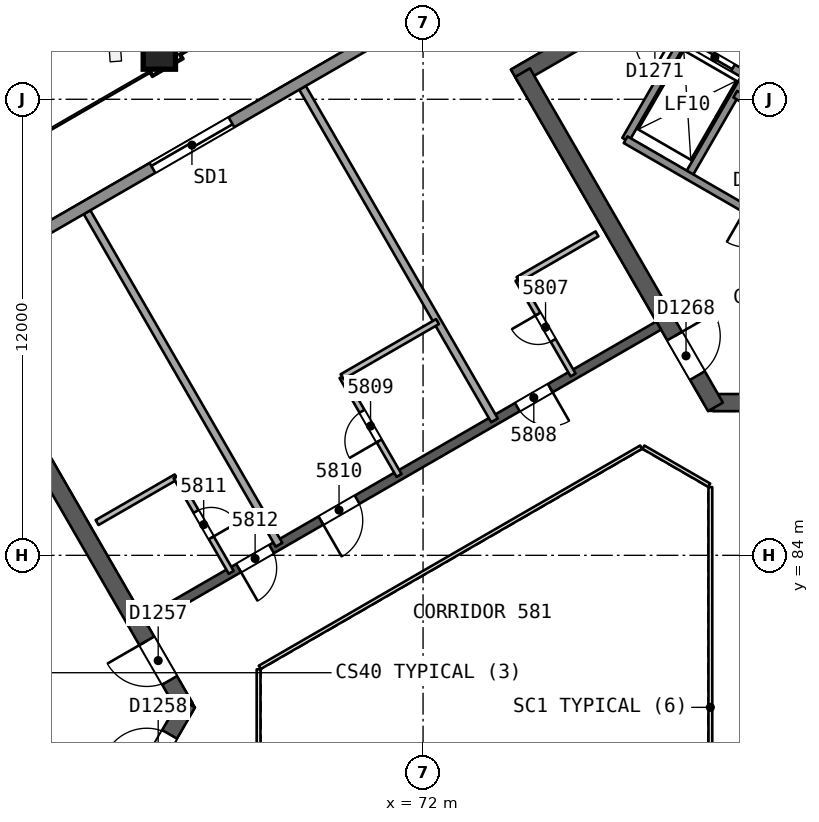
"""IFC4 building model, lengths in metres.
Left out: names, types, materials, properties, quantities, classifications, styles, units other than length and angle.
Written with IfcOpenShell. Run it as: python <this file> out.ifc"""

import sys

from ifc_helpers import new_model, si_unit, direction, frame, frame_2d, origin, origin_2d, place, context, subcontext, project, spatial, rectangle, extrude, element, fill, save


model = new_model("IFC4")
c1 = context("Model", 3, precision=1e-05, world=origin(), true_north=direction((0.0, 1.0)))
c2 = subcontext(c1, "Body", "Model", "MODEL_VIEW")
j1 = project(units=[si_unit("LENGTHUNIT", "METRE"), si_unit("PLANEANGLEUNIT", "RADIAN")], contexts=[c1])
p1 = place(None, origin())
s1 = spatial("IfcSite", under=j1, at=p1, CompositionType="ELEMENT")
p2 = place(p1, origin())
s2 = spatial("IfcBuilding", under=s1, at=p2, CompositionType="ELEMENT")
p3 = place(p2, frame((0.0, 0.0, 235.4)))
s3 = spatial("IfcBuildingStorey", under=s2, at=p3, CompositionType="ELEMENT", Elevation=235.4)
p4 = place(p3, frame((65.74, 80.0, 0.0), z_axis=(0.0, 0.0, 1.0), x_axis=(-0.499991857942, 0.866030104553, 0.0)))
e1 = element("IfcWall", 1, at=p4, inside=s3, PredefinedType="SHEAR", context=c2, shape_type="SweptSolid", body=[
    extrude(rectangle(XDim=10.25, YDim=0.45, at=frame_2d((5.125, 0.0))), origin(), (0.0, 0.0, 1.0), 3.7),
])
p5 = place(p4, frame((0.82, 0.0, 0.0)))
e2 = element("IfcOpeningElement", 2, at=p5, cuts=e1, PredefinedType="OPENING", context=c2, shape_type="SweptSolid", body=[
    extrude(rectangle(XDim=1.2, YDim=2.1, at=frame_2d((0.6, 1.05))), frame((0.0, 0.235, 0.0), z_axis=(0.0, -1.0, 0.0), x_axis=(1.0, 0.0, 0.0)), (0.0, 0.0, 1.0), 0.471),
])
p6 = place(p3, frame((60.728, 71.318, 0.0), z_axis=(0.0, 0.0, 1.0), x_axis=(0.500012416173, 0.866018235185, 0.0)))
e3 = element("IfcWall", 3, at=p6, inside=s3, PredefinedType="SHEAR", context=c2, shape_type="SweptSolid", body=[
    extrude(rectangle(XDim=10.155, YDim=0.45, at=frame_2d((5.078, 0.0))), origin(), (0.0, 0.0, 1.0), 3.7),
])
p7 = place(p6, frame((8.005, 0.0, 0.0)))
e4 = element("IfcOpeningElement", 4, at=p7, cuts=e3, PredefinedType="OPENING", context=c2, shape_type="SweptSolid", body=[
    extrude(rectangle(XDim=1.2, YDim=2.1, at=frame_2d((0.6, 1.05))), frame((0.0, 0.235, 0.0), z_axis=(0.0, -1.0, 0.0), x_axis=(1.0, 0.0, 0.0)), (0.0, 0.0, 1.0), 0.471),
])
p8 = place(p3, frame((79.63, 88.019, 0.0), z_axis=(0.0, 0.0, 1.0), x_axis=(1.0, 0.0, 0.0)))
e5 = element("IfcWall", 5, at=p8, inside=s3, PredefinedType="SHEAR", context=c2, shape_type="SweptSolid", body=[
    extrude(rectangle(XDim=10.25, YDim=0.45, at=frame_2d((5.125, 0.0))), origin(), (0.0, 0.0, 1.0), 3.7),
])
p9 = place(p8, frame((0.82, 0.0, 0.0)))
e6 = element("IfcOpeningElement", 6, at=p9, cuts=e5, PredefinedType="OPENING", context=c2, shape_type="SweptSolid", body=[
    extrude(rectangle(XDim=1.2, YDim=2.1, at=frame_2d((0.6, 1.05))), frame((0.0, 0.235, 0.0), z_axis=(0.0, -1.0, 0.0), x_axis=(1.0, 0.0, 0.0)), (0.0, 0.0, 1.0), 0.471),
])
p10 = place(p3, frame((86.723, 103.69, 0.0), z_axis=(0.0, 0.0, 1.0), x_axis=(-0.866022713978, -0.500004658852, 0.0)))
e7 = element("IfcWall", 7, at=p10, inside=s3, PredefinedType="SHEAR", context=c2, shape_type="SweptSolid", body=[
    extrude(rectangle(XDim=14.203, YDim=0.45, at=frame_2d((7.102, 0.0))), origin(), (0.0, 0.0, 1.0), 3.7),
])
p11 = place(p3, frame((74.617, 96.701, 0.0), z_axis=(0.0, 0.0, 1.0), x_axis=(0.499994385119, -0.866028645513, 0.0)))
e8 = element("IfcWall", 8, at=p11, inside=s3, PredefinedType="SHEAR", context=c2, shape_type="SweptSolid", body=[
    extrude(rectangle(XDim=10.155, YDim=0.45, at=frame_2d((5.077, 0.0))), origin(), (0.0, 0.0, 1.0), 3.7),
])
p12 = place(p11, frame((8.005, 0.0, 0.0)))
e9 = element("IfcOpeningElement", 9, at=p12, cuts=e8, PredefinedType="OPENING", context=c2, shape_type="SweptSolid", body=[
    extrude(rectangle(XDim=1.2, YDim=2.1, at=frame_2d((0.6, 1.05))), frame((0.0, 0.235, 0.0), z_axis=(0.0, -1.0, 0.0), x_axis=(1.0, 0.0, 0.0)), (0.0, 0.0, 1.0), 0.471),
])
p13 = place(p3, frame((78.2, 90.046, 0.0), z_axis=(0.0, 0.0, 1.0), x_axis=(-0.866026492143, -0.499998114903, 0.0)))
e10 = element("IfcWall", 10, at=p13, inside=s3, PredefinedType="SHEAR", context=c2, shape_type="SweptSolid", body=[
    extrude(rectangle(XDim=15.588, YDim=0.25, at=frame_2d((7.794, 0.0))), origin(), (0.0, 0.0, 1.0), 3.3),
])
p14 = place(p13, frame((3.294, 0.0, 0.0)))
e11 = element("IfcOpeningElement", 11, at=p14, cuts=e10, PredefinedType="OPENING", context=c2, shape_type="SweptSolid", body=[
    extrude(rectangle(XDim=1.0, YDim=2.1, at=frame_2d((0.5, 1.05))), frame((0.0, 0.135, 0.0), z_axis=(0.0, -1.0, 0.0), x_axis=(1.0, 0.0, 0.0)), (0.0, 0.0, 1.0), 0.271),
])
p15 = place(p13, frame((9.162, 0.0, 0.0)))
e12 = element("IfcOpeningElement", 12, at=p15, cuts=e10, PredefinedType="OPENING", context=c2, shape_type="SweptSolid", body=[
    extrude(rectangle(XDim=1.1, YDim=2.1, at=frame_2d((0.55, 1.05))), frame((0.0, 0.135, 0.0), z_axis=(0.0, -1.0, 0.0), x_axis=(1.0, 0.0, 0.0)), (0.0, 0.0, 1.0), 0.271),
])
p16 = place(p13, frame((11.762, 0.0, 0.0)))
e13 = element("IfcOpeningElement", 13, at=p16, cuts=e10, PredefinedType="OPENING", context=c2, shape_type="SweptSolid", body=[
    extrude(rectangle(XDim=1.0, YDim=2.1, at=frame_2d((0.5, 1.05))), frame((0.0, 0.135, 0.0), z_axis=(0.0, -1.0, 0.0), x_axis=(1.0, 0.0, 0.0)), (0.0, 0.0, 1.0), 0.271),
])
p17 = place(p3, frame((65.048, 97.237, 0.0), z_axis=(0.010092954999, -0.017481261926, 0.999796248113), x_axis=(-0.499897099477, 0.865849541015, 0.020185694417)))
e14 = element("IfcColumn", 14, at=p17, inside=s3, PredefinedType="COLUMN", context=c2, shape_type="SweptSolid", body=[
    extrude(rectangle(XDim=0.85, YDim=0.85, at=origin_2d()), origin(), (0.0, 0.0, 1.0), 3.701),
])
p18 = place(p3, frame((75.948, 88.746, 0.0), z_axis=(0.0, 0.0, 1.0), x_axis=(-0.499987231761, 0.866032775405, 0.0)))
e15 = element("IfcWall", 15, at=p18, inside=s3, PredefinedType="PARTITIONING", context=c2, shape_type="SweptSolid", body=[
    extrude(rectangle(XDim=2.9, YDim=0.15, at=frame_2d((1.45, 0.0))), origin(), (0.0, 0.0, 1.0), 3.3),
])
p19 = place(p18, frame((1.05, 0.0, 0.0)))
e16 = element("IfcOpeningElement", 16, at=p19, cuts=e15, PredefinedType="OPENING", context=c2, shape_type="SweptSolid", body=[
    extrude(rectangle(XDim=0.8, YDim=2.1, at=frame_2d((0.4, 1.05))), frame((0.0, 0.085, 0.0), z_axis=(0.0, -1.0, 0.0), x_axis=(1.0, 0.0, 0.0)), (0.0, 0.0, 1.0), 0.171),
])
p20 = place(p3, frame((74.498, 91.257, 0.0), z_axis=(0.0, 0.0, 1.0), x_axis=(0.866038271014, 0.499977712642, 0.0)))
e17 = element("IfcWall", 17, at=p20, inside=s3, PredefinedType="PARTITIONING", context=c2, shape_type="SweptSolid", body=[
    extrude(rectangle(XDim=2.401, YDim=0.15, at=frame_2d((1.2, 0.0))), origin(), (0.0, 0.0, 1.0), 3.3),
])
p21 = place(p3, frame((68.828, 96.302, 0.0), z_axis=(0.0, 0.0, 1.0), x_axis=(0.499992962407, -0.866029466902, 0.0)))
e18 = element("IfcWall", 18, at=p21, inside=s3, PredefinedType="PARTITIONING", context=c2, shape_type="SweptSolid", body=[
    extrude(rectangle(XDim=10.104, YDim=0.2, at=frame_2d((5.052, 0.0))), origin(), (0.0, 0.0, 1.0), 3.3),
])
p22 = place(p3, frame((71.368, 86.102, 0.0), z_axis=(0.0, 0.0, 1.0), x_axis=(-0.50002537861, 0.866010750942, 0.0)))
e19 = element("IfcWall", 19, at=p22, inside=s3, PredefinedType="PARTITIONING", context=c2, shape_type="SweptSolid", body=[
    extrude(rectangle(XDim=3.0, YDim=0.15, at=frame_2d((1.5, 0.0))), origin(), (0.0, 0.0, 1.0), 3.3),
])
p23 = place(p22, frame((1.05, 0.0, 0.0)))
e20 = element("IfcOpeningElement", 20, at=p23, cuts=e19, PredefinedType="OPENING", context=c2, shape_type="SweptSolid", body=[
    extrude(rectangle(XDim=0.9, YDim=2.1, at=frame_2d((0.45, 1.05))), frame((0.0, 0.085, 0.0), z_axis=(0.0, -1.0, 0.0), x_axis=(1.0, 0.0, 0.0)), (0.0, 0.0, 1.0), 0.171),
])
p24 = place(p3, frame((69.868, 88.7, 0.0), z_axis=(0.0, 0.0, 1.0), x_axis=(0.865996321171, 0.50005036918, 0.0)))
e21 = element("IfcWall", 21, at=p24, inside=s3, PredefinedType="PARTITIONING", context=c2, shape_type="SweptSolid", body=[
    extrude(rectangle(XDim=2.9, YDim=0.15, at=frame_2d((1.45, 0.0))), origin(), (0.0, 0.0, 1.0), 3.3),
])
p25 = place(p3, frame((63.158, 93.029, 0.0), z_axis=(0.0, 0.0, 1.0), x_axis=(0.499992962407, -0.866029466902, 0.0)))
e22 = element("IfcWall", 22, at=p25, inside=s3, PredefinedType="PARTITIONING", context=c2, shape_type="SweptSolid", body=[
    extrude(rectangle(XDim=10.104, YDim=0.2, at=frame_2d((5.052, 0.0))), origin(), (0.0, 0.0, 1.0), 3.3),
])
p26 = place(p3, frame((63.422, 84.863, 0.0), z_axis=(0.0, 0.0, 1.0), x_axis=(0.865994240961, 0.500053971709, 0.0)))
e23 = element("IfcWall", 23, at=p26, inside=s3, PredefinedType="PARTITIONING", context=c2, shape_type="SweptSolid", body=[
    extrude(rectangle(XDim=2.401, YDim=0.15, at=frame_2d((1.201, 0.0))), origin(), (0.0, 0.0, 1.0), 3.3),
])
p27 = place(p3, frame((65.502, 86.063, 0.0), z_axis=(0.0, 0.0, 1.0), x_axis=(0.499987231761, -0.866032775405, 0.0)))
e24 = element("IfcWall", 24, at=p27, inside=s3, PredefinedType="PARTITIONING", context=c2, shape_type="SweptSolid", body=[
    extrude(rectangle(XDim=2.9, YDim=0.15, at=frame_2d((1.45, 0.0))), origin(), (0.0, 0.0, 1.0), 3.3),
])
p28 = place(p27, frame((1.05, 0.0, 0.0)))
e25 = element("IfcOpeningElement", 25, at=p28, cuts=e24, PredefinedType="OPENING", context=c2, shape_type="SweptSolid", body=[
    extrude(rectangle(XDim=0.8, YDim=2.1, at=frame_2d((0.4, 1.05))), frame((0.0, 0.085, 0.0), z_axis=(0.0, -1.0, 0.0), x_axis=(1.0, 0.0, 0.0)), (0.0, 0.0, 1.0), 0.171),
])
p29 = place(p3, frame((44.715, 82.552, 0.0), z_axis=(0.0, 0.0, 1.0), x_axis=(0.866025334516, 0.500000119977, 0.0)))
e26 = element("IfcWall", 26, at=p29, inside=s3, PredefinedType="SOLIDWALL", context=c2, shape_type="SweptSolid", body=[
    extrude(rectangle(XDim=49.903, YDim=0.3, at=frame_2d((24.952, 0.0))), origin(), (0.0, 0.0, 1.0), 3.3),
])
p30 = place(p29, frame((23.284, 0.0, 0.0)))
e27 = element("IfcOpeningElement", 27, at=p30, cuts=e26, PredefinedType="OPENING", context=c2, shape_type="SweptSolid", body=[
    extrude(rectangle(XDim=2.4, YDim=2.4, at=frame_2d((1.2, 1.2))), frame((0.0, 0.161, 0.0), z_axis=(0.0, -1.0, 0.0), x_axis=(1.0, 0.0, 0.0)), (0.0, 0.0, 1.0), 0.321),
])
p31 = place(p29, frame((37.674, 0.0, 0.0)))
e28 = element("IfcOpeningElement", 28, at=p31, cuts=e26, PredefinedType="OPENING", context=c2, shape_type="SweptSolid", body=[
    extrude(rectangle(XDim=2.4, YDim=2.4, at=frame_2d((1.2, 1.2))), frame((0.0, 0.161, 0.0), z_axis=(0.0, -1.0, 0.0), x_axis=(1.0, 0.0, 0.0)), (0.0, 0.0, 1.0), 0.321),
])
p32 = place(p29, frame((9.362, 0.0, 0.0)))
e29 = element("IfcOpeningElement", 29, at=p32, cuts=e26, PredefinedType="OPENING", context=c2, shape_type="SweptSolid", body=[
    extrude(rectangle(XDim=2.4, YDim=2.4, at=frame_2d((1.2, 1.2))), frame((0.0, 0.161, 0.0), z_axis=(0.0, -1.0, 0.0), x_axis=(1.0, 0.0, 0.0)), (0.0, 0.0, 1.0), 0.321),
])
for number, where, z_axis, x_axis in (
    (30, (78.976, 93.986, 0.0), (0.0, 0.0, 1.0), (0.5, 0.866, 0.0)),
    (31, (77.33, 94.936, 0.0), (0.0, 0.0, 1.0), (0.5, 0.866, 0.0)),
):
    element("IfcWall", number, at=place(p3, frame(where, z_axis=z_axis, x_axis=x_axis)), inside=s3, PredefinedType="SOLIDWALL", context=c2, shape_type="SweptSolid", body=[
        extrude(rectangle(XDim=3.05, YDim=0.2, at=frame_2d((1.525, 0.0))), origin(), (0.0, 0.0, 1.0), 3.3),
    ])
p33 = place(p3, frame((86.77, 89.486, 0.0), z_axis=(0.0, 0.0, 1.0), x_axis=(-0.86601811187, 0.500012629753, 0.0)))
e32 = element("IfcWall", 32, at=p33, inside=s3, PredefinedType="SOLIDWALL", context=c2, shape_type="SweptSolid", body=[
    extrude(rectangle(XDim=10.9, YDim=0.2, at=frame_2d((5.45, 0.0))), origin(), (0.0, 0.0, 1.0), 3.3),
])
p34 = place(p33, frame((1.75, 0.0, 0.0)))
e33 = element("IfcOpeningElement", 33, at=p34, cuts=e32, PredefinedType="OPENING", context=c2, shape_type="SweptSolid", body=[
    extrude(rectangle(XDim=1.0, YDim=2.1, at=frame_2d((0.5, 1.05))), frame((0.0, 0.11, 0.0), z_axis=(0.0, -1.0, 0.0), x_axis=(1.0, 0.0, 0.0)), (0.0, 0.0, 1.0), 0.221),
])
p35 = place(p33, frame((6.25, 0.0, 0.0)))
e34 = element("IfcOpeningElement", 34, at=p35, cuts=e32, PredefinedType="OPENING", context=c2, shape_type="SweptSolid", body=[
    extrude(rectangle(XDim=1.0, YDim=2.1, at=frame_2d((0.5, 1.05))), frame((0.0, 0.11, 0.0), z_axis=(0.0, -1.0, 0.0), x_axis=(1.0, 0.0, 0.0)), (0.0, 0.0, 1.0), 0.221),
])
p36 = place(p3, frame((89.43, 90.814, 0.0), z_axis=(0.0, 0.0, 1.0), x_axis=(-0.866018983788, 0.500011119594, 0.0)))
e35 = element("IfcWall", 35, at=p36, inside=s3, PredefinedType="SOLIDWALL", context=c2, shape_type="SweptSolid", body=[
    extrude(rectangle(XDim=10.64, YDim=0.2, at=frame_2d((5.32, 0.0))), origin(), (0.0, 0.0, 1.0), 3.3),
])
p37 = place(p36, frame((0.37, 0.0, 0.0)))
e36 = element("IfcOpeningElement", 36, at=p37, cuts=e35, PredefinedType="OPENING", context=c2, shape_type="SweptSolid", body=[
    extrude(rectangle(XDim=0.9, YDim=2.1, at=frame_2d((0.45, 1.05))), frame((0.0, 0.11, 0.0), z_axis=(0.0, -1.0, 0.0), x_axis=(1.0, 0.0, 0.0)), (0.0, 0.0, 1.0), 0.221),
])
p38 = place(p3, frame((80.5, 96.627, 0.0), z_axis=(0.0, 0.0, 1.0), x_axis=(-0.86601224135, 0.500022797313, 0.0)))
e37 = element("IfcWall", 37, at=p38, inside=s3, PredefinedType="SOLIDWALL", context=c2, shape_type="SweptSolid", body=[
    extrude(rectangle(XDim=1.9, YDim=0.2, at=frame_2d((0.95, 0.0))), origin(), (0.0, 0.0, 1.0), 3.3),
])
p39 = place(p38, frame((0.4, 0.0, 0.0)))
e38 = element("IfcOpeningElement", 38, at=p39, cuts=e37, PredefinedType="OPENING", context=c2, shape_type="SweptSolid", body=[
    extrude(rectangle(XDim=1.1, YDim=2.1, at=frame_2d((0.55, 1.05))), frame((0.0, 0.11, 0.0), z_axis=(0.0, -1.0, 0.0), x_axis=(1.0, 0.0, 0.0)), (0.0, 0.0, 1.0), 0.221),
])
p40 = place(p3, frame((79.56, 74.206, 0.0), z_axis=(0.0, 0.0, 1.0), x_axis=(0.0, 1.0, 0.0)))
e39 = element("IfcWall", 39, at=p40, inside=s3, PredefinedType="PARTITIONING", context=c2, shape_type="SweptSolid", body=[
    extrude(rectangle(XDim=11.588, YDim=0.1, at=frame_2d((5.794, 0.0))), origin(), (0.0, 0.0, 1.0), 3.3),
])
p41 = place(p3, frame((79.53, 85.846, 0.0), z_axis=(0.0, 0.0, 1.0), x_axis=(-0.866041268327, 0.499972520799, 0.0)))
e40 = element("IfcWall", 40, at=p41, inside=s3, PredefinedType="PARTITIONING", context=c2, shape_type="SweptSolid", body=[
    extrude(rectangle(XDim=2.0, YDim=0.1, at=frame_2d((1.0, 0.0))), origin(), (0.0, 0.0, 1.0), 3.3),
])
p42 = place(p3, frame((77.738, 86.846, 0.0), z_axis=(0.0, 0.0, 1.0), x_axis=(-0.866026658274, -0.499997827154, 0.0)))
e41 = element("IfcWall", 41, at=p42, inside=s3, PredefinedType="PARTITIONING", context=c2, shape_type="SweptSolid", body=[
    extrude(rectangle(XDim=11.588, YDim=0.1, at=frame_2d((5.794, 0.0))), origin(), (0.0, 0.0, 1.0), 3.3),
])
p43 = place(p3, frame((67.672, 81.0, 0.0), z_axis=(0.0, 0.0, 1.0), x_axis=(0.0, -1.0, 0.0)))
e42 = element("IfcWall", 42, at=p43, inside=s3, PredefinedType="PARTITIONING", context=c2, shape_type="SweptSolid", body=[
    extrude(rectangle(XDim=2.0, YDim=0.1, at=frame_2d((1.0, 0.0))), origin(), (0.0, 0.0, 1.0), 3.3),
])
p44 = place(p19, origin())
e43 = element("IfcDoor", 43, at=p44, inside=s3, OperationType="SINGLE_SWING_RIGHT", PredefinedType="NOTDEFINED", context=c2, shape_type="SweptSolid", body=[
    extrude(rectangle(XDim=0.8, YDim=2.1, at=frame_2d((0.4, 1.05))), frame((0.0, 0.025, 0.0), z_axis=(0.0, -1.0, 0.0), x_axis=(1.0, 0.0, 0.0)), (0.0, 0.0, 1.0), 0.05),
])
fill(e16, e43)
p45 = place(p14, origin())
e44 = element("IfcDoor", 44, at=p45, inside=s3, OperationType="SINGLE_SWING_LEFT", PredefinedType="NOTDEFINED", context=c2, shape_type="SweptSolid", body=[
    extrude(rectangle(XDim=1.0, YDim=2.1, at=frame_2d((0.5, 1.05))), frame((0.0, 0.025, 0.0), z_axis=(0.0, -1.0, 0.0), x_axis=(1.0, 0.0, 0.0)), (0.0, 0.0, 1.0), 0.05),
])
fill(e11, e44)
p46 = place(p23, origin())
e45 = element("IfcDoor", 45, at=p46, inside=s3, OperationType="SINGLE_SWING_LEFT", PredefinedType="NOTDEFINED", context=c2, shape_type="SweptSolid", body=[
    extrude(rectangle(XDim=0.9, YDim=2.1, at=frame_2d((0.45, 1.05))), frame((0.0, 0.025, 0.0), z_axis=(0.0, -1.0, 0.0), x_axis=(1.0, 0.0, 0.0)), (0.0, 0.0, 1.0), 0.05),
])
fill(e20, e45)
p47 = place(p15, origin())
e46 = element("IfcDoor", 46, at=p47, inside=s3, OperationType="SINGLE_SWING_RIGHT", PredefinedType="NOTDEFINED", context=c2, shape_type="SweptSolid", body=[
    extrude(rectangle(XDim=1.1, YDim=2.1, at=frame_2d((0.55, 1.05))), frame((0.0, 0.025, 0.0), z_axis=(0.0, -1.0, 0.0), x_axis=(1.0, 0.0, 0.0)), (0.0, 0.0, 1.0), 0.05),
])
fill(e12, e46)
p48 = place(p28, origin())
e47 = element("IfcDoor", 47, at=p48, inside=s3, OperationType="SINGLE_SWING_RIGHT", PredefinedType="NOTDEFINED", context=c2, shape_type="SweptSolid", body=[
    extrude(rectangle(XDim=0.8, YDim=2.1, at=frame_2d((0.4, 1.05))), frame((0.0, 0.025, 0.0), z_axis=(0.0, -1.0, 0.0), x_axis=(1.0, 0.0, 0.0)), (0.0, 0.0, 1.0), 0.05),
])
fill(e25, e47)
p49 = place(p16, origin())
e48 = element("IfcDoor", 48, at=p49, inside=s3, OperationType="SINGLE_SWING_RIGHT", PredefinedType="NOTDEFINED", context=c2, shape_type="SweptSolid", body=[
    extrude(rectangle(XDim=1.0, YDim=2.1, at=frame_2d((0.5, 1.05))), frame((0.0, 0.025, 0.0), z_axis=(0.0, -1.0, 0.0), x_axis=(1.0, 0.0, 0.0)), (0.0, 0.0, 1.0), 0.05),
])
fill(e13, e48)
p50 = place(p30, origin())
e49 = element("IfcDoor", 49, at=p50, inside=s3, OperationType="SLIDING_TO_LEFT", PredefinedType="NOTDEFINED", context=c2, shape_type="SweptSolid", body=[
    extrude(rectangle(XDim=2.4, YDim=2.4, at=frame_2d((1.2, 1.2))), frame((0.0, 0.025, 0.0), z_axis=(0.0, -1.0, 0.0), x_axis=(1.0, 0.0, 0.0)), (0.0, 0.0, 1.0), 0.05),
])
fill(e27, e49)
p51 = place(p5, origin())
e50 = element("IfcDoor", 50, at=p51, inside=s3, OperationType="SINGLE_SWING_RIGHT", PredefinedType="NOTDEFINED", context=c2, shape_type="SweptSolid", body=[
    extrude(rectangle(XDim=1.2, YDim=2.1, at=frame_2d((0.6, 1.05))), frame((0.0, 0.025, 0.0), z_axis=(0.0, -1.0, 0.0), x_axis=(1.0, 0.0, 0.0)), (0.0, 0.0, 1.0), 0.05),
])
fill(e2, e50)
p52 = place(p7, origin())
e51 = element("IfcDoor", 51, at=p52, inside=s3, OperationType="SINGLE_SWING_LEFT", PredefinedType="NOTDEFINED", context=c2, shape_type="SweptSolid", body=[
    extrude(rectangle(XDim=1.2, YDim=2.1, at=frame_2d((0.6, 1.05))), frame((0.0, 0.025, 0.0), z_axis=(0.0, -1.0, 0.0), x_axis=(1.0, 0.0, 0.0)), (0.0, 0.0, 1.0), 0.05),
])
fill(e4, e51)
p53 = place(p12, origin())
e52 = element("IfcDoor", 52, at=p53, inside=s3, OperationType="SINGLE_SWING_LEFT", PredefinedType="NOTDEFINED", context=c2, shape_type="SweptSolid", body=[
    extrude(rectangle(XDim=1.2, YDim=2.1, at=frame_2d((0.6, 1.05))), frame((0.0, 0.025, 0.0), z_axis=(0.0, -1.0, 0.0), x_axis=(1.0, 0.0, 0.0)), (0.0, 0.0, 1.0), 0.05),
])
fill(e9, e52)
p54 = place(p39, origin())
e53 = element("IfcDoor", 53, at=p54, inside=s3, OperationType="SLIDING_TO_RIGHT", PredefinedType="NOTDEFINED", context=c2, shape_type="SweptSolid", body=[
    extrude(rectangle(XDim=1.1, YDim=2.1, at=frame_2d((0.55, 1.05))), frame((0.0, 0.025, 0.0), z_axis=(0.0, -1.0, 0.0), x_axis=(1.0, 0.0, 0.0)), (0.0, 0.0, 1.0), 0.05),
])
fill(e38, e53)
save(model, sys.argv[1])
